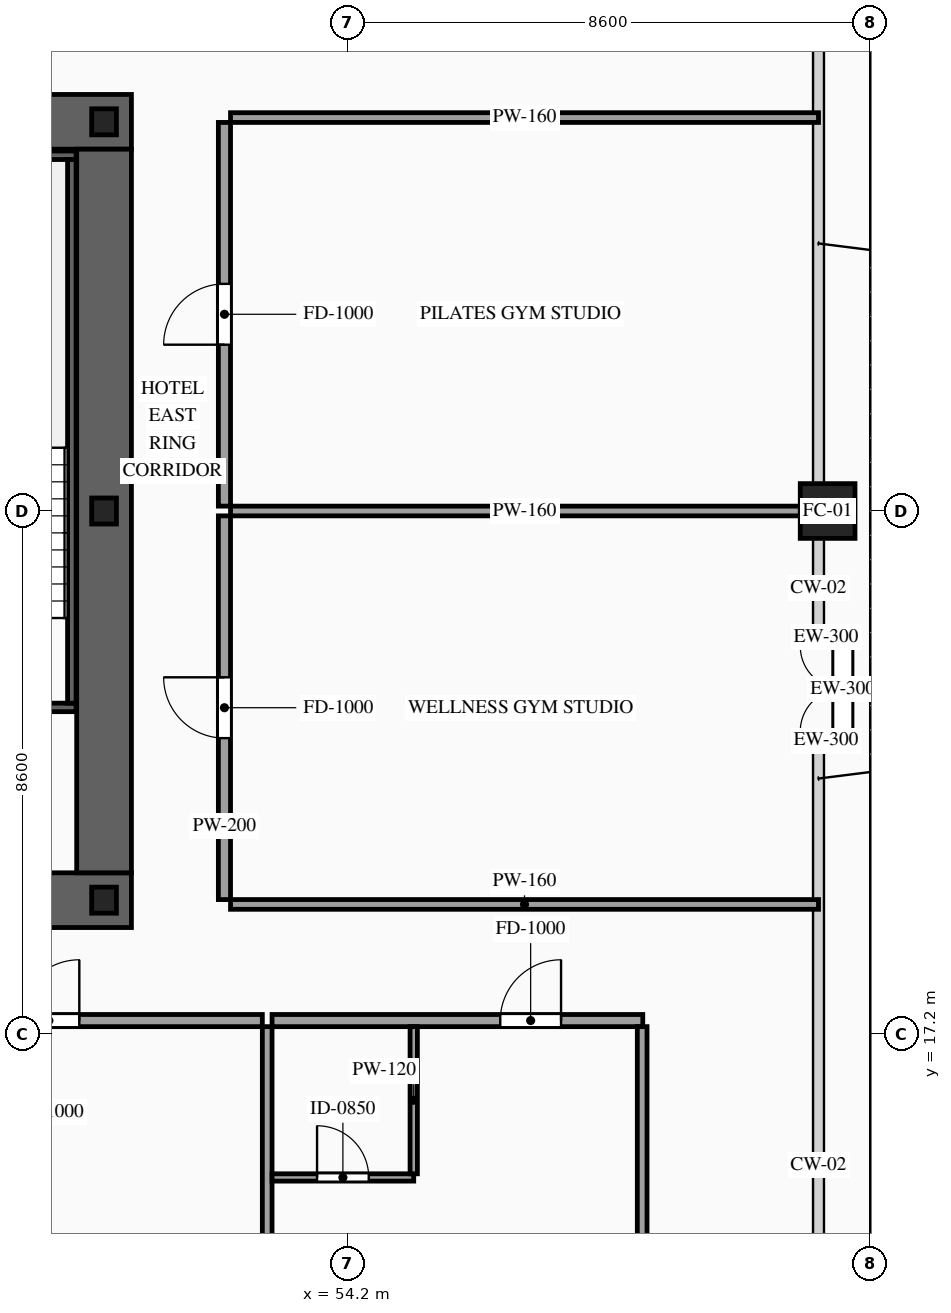
"""IFC4 building model, lengths in metres.
Left out: names, types, materials, properties, quantities, classifications, styles, units other than length and angle.
Written with IfcOpenShell. Run it as: python <this file> out.ifc"""

import sys

from ifc_helpers import new_model, si_unit, direction, frame, frame_2d, origin, origin_2d, place, context, subcontext, project, spatial, rectangle, hollow_rectangle, i_section, extrude, source, transform, mapped, element, fill, save


model = new_model("IFC4")
c1 = context("Model", 3, precision=1e-05, world=origin(), true_north=direction((0.0, 1.0)))
c2 = subcontext(c1, "Body", "Model", "MODEL_VIEW")
j1 = project(units=[si_unit("LENGTHUNIT", "METRE"), si_unit("PLANEANGLEUNIT", "RADIAN")], contexts=[c1])
p1 = place(None, origin())
s1 = spatial("IfcSite", under=j1, at=p1, CompositionType="ELEMENT")
p2 = place(p1, origin())
s2 = spatial("IfcBuilding", under=s1, at=p2, CompositionType="ELEMENT")
p3 = place(p2, frame((0.0, 0.0, 71.2)))
s3 = spatial("IfcBuildingStorey", under=s2, at=p3, CompositionType="ELEMENT", Elevation=71.2)
p4 = place(p3, frame((23.35, 19.4, 0.0), z_axis=(0.0, 0.0, 1.0), x_axis=(1.0, 0.0, 0.0)))
e1 = element("IfcWall", 1, at=p4, inside=s3, PredefinedType="SHEAR", context=c2, shape_type="SweptSolid", body=[
    extrude(rectangle(XDim=27.3, YDim=0.9, at=frame_2d((13.65, 0.0))), origin(), (0.0, 0.0, 1.0), 3.6),
])
p5 = place(p4, frame((2.1, 0.0, 0.0)))
e2 = element("IfcOpeningElement", 2, at=p5, cuts=e1, PredefinedType="OPENING", context=c2, shape_type="SweptSolid", body=[
    extrude(rectangle(XDim=1.1, YDim=2.2, at=frame_2d((0.55, 1.1))), frame((0.0, 0.465, 0.0), z_axis=(0.0, -1.0, 0.0), x_axis=(1.0, 0.0, 0.0)), (0.0, 0.0, 1.0), 0.93),
])
p6 = place(p4, frame((10.0, 0.0, 0.0)))
e3 = element("IfcOpeningElement", 3, at=p6, cuts=e1, PredefinedType="OPENING", context=c2, shape_type="SweptSolid", body=[
    extrude(rectangle(XDim=1.1, YDim=2.2, at=frame_2d((0.55, 1.1))), frame((0.0, 0.465, 0.0), z_axis=(0.0, -1.0, 0.0), x_axis=(1.0, 0.0, 0.0)), (0.0, 0.0, 1.0), 0.93),
])
p7 = place(p4, frame((23.2, 0.0, 0.0)))
e4 = element("IfcOpeningElement", 4, at=p7, cuts=e1, PredefinedType="OPENING", context=c2, shape_type="SweptSolid", body=[
    extrude(rectangle(XDim=1.1, YDim=2.2, at=frame_2d((0.55, 1.1))), frame((0.0, 0.465, 0.0), z_axis=(0.0, -1.0, 0.0), x_axis=(1.0, 0.0, 0.0)), (0.0, 0.0, 1.0), 0.93),
])
p8 = place(p4, frame((19.82, 0.0, 0.0)))
e5 = element("IfcOpeningElement", 5, at=p8, cuts=e1, PredefinedType="OPENING", context=c2, shape_type="SweptSolid", body=[
    extrude(rectangle(XDim=0.9, YDim=2.15, at=frame_2d((0.45, 1.075))), frame((0.0, 0.465, 0.0), z_axis=(0.0, -1.0, 0.0), x_axis=(1.0, 0.0, 0.0)), (0.0, 0.0, 1.0), 0.93),
])
p9 = place(p4, frame((18.38, 0.0, 0.0)))
e6 = element("IfcOpeningElement", 6, at=p9, cuts=e1, PredefinedType="OPENING", context=c2, shape_type="SweptSolid", body=[
    extrude(rectangle(XDim=0.9, YDim=2.15, at=frame_2d((0.45, 1.075))), frame((0.0, 0.465, 0.0), z_axis=(0.0, -1.0, 0.0), x_axis=(1.0, 0.0, 0.0)), (0.0, 0.0, 1.0), 0.93),
])
p10 = place(p3, frame((23.35, 32.2, 0.0), z_axis=(0.0, 0.0, 1.0), x_axis=(1.0, 0.0, 0.0)))
e7 = element("IfcWall", 7, at=p10, inside=s3, PredefinedType="SHEAR", context=c2, shape_type="SweptSolid", body=[
    extrude(rectangle(XDim=27.3, YDim=0.9, at=frame_2d((13.65, 0.0))), origin(), (0.0, 0.0, 1.0), 3.6),
])
p11 = place(p10, frame((4.72, 0.0, 0.0)))
e8 = element("IfcOpeningElement", 8, at=p11, cuts=e7, PredefinedType="OPENING", context=c2, shape_type="SweptSolid", body=[
    extrude(rectangle(XDim=0.9, YDim=2.15, at=frame_2d((0.45, 1.075))), frame((0.0, 0.465, 0.0), z_axis=(0.0, -1.0, 0.0), x_axis=(1.0, 0.0, 0.0)), (0.0, 0.0, 1.0), 0.93),
])
p12 = place(p10, frame((10.0, 0.0, 0.0)))
e9 = element("IfcOpeningElement", 9, at=p12, cuts=e7, PredefinedType="OPENING", context=c2, shape_type="SweptSolid", body=[
    extrude(rectangle(XDim=1.1, YDim=2.2, at=frame_2d((0.55, 1.1))), frame((0.0, 0.465, 0.0), z_axis=(0.0, -1.0, 0.0), x_axis=(1.0, 0.0, 0.0)), (0.0, 0.0, 1.0), 0.93),
])
p13 = place(p10, frame((15.85, 0.0, 0.0)))
e10 = element("IfcOpeningElement", 10, at=p13, cuts=e7, PredefinedType="OPENING", context=c2, shape_type="SweptSolid", body=[
    extrude(rectangle(XDim=1.1, YDim=2.2, at=frame_2d((0.55, 1.1))), frame((0.0, 0.465, 0.0), z_axis=(0.0, -1.0, 0.0), x_axis=(1.0, 0.0, 0.0)), (0.0, 0.0, 1.0), 0.93),
])
p14 = place(p10, frame((18.38, 0.0, 0.0)))
e11 = element("IfcOpeningElement", 11, at=p14, cuts=e7, PredefinedType="OPENING", context=c2, shape_type="SweptSolid", body=[
    extrude(rectangle(XDim=0.9, YDim=2.15, at=frame_2d((0.45, 1.075))), frame((0.0, 0.465, 0.0), z_axis=(0.0, -1.0, 0.0), x_axis=(1.0, 0.0, 0.0)), (0.0, 0.0, 1.0), 0.93),
])
p15 = place(p10, frame((19.82, 0.0, 0.0)))
e12 = element("IfcOpeningElement", 12, at=p15, cuts=e7, PredefinedType="OPENING", context=c2, shape_type="SweptSolid", body=[
    extrude(rectangle(XDim=0.9, YDim=2.15, at=frame_2d((0.45, 1.075))), frame((0.0, 0.465, 0.0), z_axis=(0.0, -1.0, 0.0), x_axis=(1.0, 0.0, 0.0)), (0.0, 0.0, 1.0), 0.93),
])
m1 = source(origin(), c2, "Body", "SweptSolid", [
    extrude(rectangle(XDim=11.9, YDim=0.9, at=frame_2d((5.95, 0.0))), origin(), (0.0, 0.0, 1.0), 3.6),
])
p16 = place(p3, frame((50.2, 19.85, 0.0), z_axis=(0.0, 0.0, 1.0), x_axis=(0.0, 1.0, 0.0)))
e13 = element("IfcWall", 13, at=p16, inside=s3, PredefinedType="SHEAR", context=c2, shape_type="MappedRepresentation", body=[
    mapped(m1, transform((0.0, 0.0, 0.0), scale=1.0)),
])
m2 = source(origin(), c2, "Body", "SweptSolid", [
    extrude(i_section(OverallWidth=0.407, OverallDepth=0.428, WebThickness=0.02, FlangeThickness=0.035, at=origin_2d()), origin(), (0.0, 0.0, 1.0), 3.6),
])
for number, where, z_axis, x_axis in (
    (14, (50.2, 19.4, 0.0), (0.0, 0.0, 1.0), (1.0, 0.0, 0.0)),
    (15, (50.2, 25.8, 0.0), (0.0, 0.0, 1.0), (1.0, 0.0, 0.0)),
    (16, (50.2, 32.2, 0.0), (0.0, 0.0, 1.0), (1.0, 0.0, 0.0)),
):
    element("IfcColumn", number, at=place(p3, frame(where, z_axis=z_axis, x_axis=x_axis)), inside=s3, PredefinedType="COLUMN", context=c2, shape_type="MappedRepresentation", body=[
        mapped(m2, transform((0.0, 0.0, 0.0), scale=1.0)),
    ])
m3 = source(origin(), c2, "Body", "SweptSolid", [
    extrude(hollow_rectangle(XDim=0.9, YDim=0.9, WallThickness=0.042, at=origin_2d()), origin(), (0.0, 0.0, 1.0), 3.6),
])
p17 = place(p3, frame((62.1, 25.8, 0.0), z_axis=(0.0, 0.0, 1.0), x_axis=(1.0, 0.0, 0.0)))
e17 = element("IfcColumn", 17, at=p17, inside=s3, PredefinedType="COLUMN", context=c2, shape_type="MappedRepresentation", body=[
    mapped(m3, transform((0.0, 0.0, 0.0), scale=1.0)),
])
p18 = place(p3, frame((62.35, 21.875, 0.0), z_axis=(0.0, 0.0, 1.0), x_axis=(0.0, 1.0, 0.0)))
e18 = element("IfcWall", 18, at=p18, inside=s3, PredefinedType="SOLIDWALL", context=c2, shape_type="SweptSolid", body=[
    extrude(rectangle(XDim=2.0, YDim=0.3, at=frame_2d((1.0, 0.0))), origin(), (0.0, 0.0, 1.0), 3.38),
])
p19 = place(p18, frame((0.3, 0.0, 0.0)))
e19 = element("IfcOpeningElement", 19, at=p19, cuts=e18, PredefinedType="OPENING", context=c2, shape_type="SweptSolid", body=[
    extrude(rectangle(XDim=1.4, YDim=2.3, at=frame_2d((0.7, 1.15))), frame((0.0, 0.165, 0.0), z_axis=(0.0, -1.0, 0.0), x_axis=(1.0, 0.0, 0.0)), (0.0, 0.0, 1.0), 0.33),
])
m4 = source(origin(), c2, "Body", "SweptSolid", [
    extrude(rectangle(XDim=0.25, YDim=0.3, at=frame_2d((0.125, 0.0))), origin(), (0.0, 0.0, 1.0), 3.38),
])
for number, where, z_axis, x_axis in (
    (20, (61.95, 22.025, 0.0), (0.0, 0.0, 1.0), (1.0, 0.0, 0.0)),
    (21, (62.2, 23.725, 0.0), (0.0, 0.0, 1.0), (-1.0, 0.0, 0.0)),
):
    element("IfcWall", number, at=place(p3, frame(where, z_axis=z_axis, x_axis=x_axis)), inside=s3, PredefinedType="SOLIDWALL", context=c2, shape_type="MappedRepresentation", body=[
        mapped(m4, transform((0.0, 0.0, 0.0), scale=1.0)),
    ])
p20 = place(p3, frame((46.46, 22.57, 0.0), z_axis=(0.0, 0.0, 1.0), x_axis=(1.0, 0.0, 0.0)))
e22 = element("IfcWall", 22, at=p20, inside=s3, PredefinedType="SOLIDWALL", context=c2, shape_type="SweptSolid", body=[
    extrude(rectangle(XDim=3.28, YDim=0.14, at=frame_2d((1.64, 0.0))), origin(), (0.0, 0.0, 1.0), 3.38),
])
p21 = place(p20, frame((1.09, 0.0, 0.0)))
e23 = element("IfcOpeningElement", 23, at=p21, cuts=e22, PredefinedType="OPENING", context=c2, shape_type="SweptSolid", body=[
    extrude(rectangle(XDim=1.1, YDim=2.2, at=frame_2d((0.55, 1.1))), frame((0.0, 0.085, 0.0), z_axis=(0.0, -1.0, 0.0), x_axis=(1.0, 0.0, 0.0)), (0.0, 0.0, 1.0), 0.17),
])
m5 = source(origin(), c2, "Body", "SweptSolid", [
    extrude(rectangle(XDim=3.28, YDim=0.14, at=frame_2d((1.64, 0.0))), origin(), (0.0, 0.0, 1.0), 3.38),
])
p22 = place(p3, frame((46.46, 31.65, 0.0), z_axis=(0.0, 0.0, 1.0), x_axis=(1.0, 0.0, 0.0)))
e24 = element("IfcWall", 24, at=p22, inside=s3, PredefinedType="SOLIDWALL", context=c2, shape_type="MappedRepresentation", body=[
    mapped(m5, transform((0.0, 0.0, 0.0), scale=1.0)),
])
m6 = source(origin(), c2, "Body", "SweptSolid", [
    extrude(rectangle(XDim=8.94, YDim=0.14, at=frame_2d((4.47, 0.0))), origin(), (0.0, 0.0, 1.0), 3.38),
])
p23 = place(p3, frame((49.67, 22.64, 0.0), z_axis=(0.0, 0.0, 1.0), x_axis=(0.0, 1.0, 0.0)))
e25 = element("IfcWall", 25, at=p23, inside=s3, PredefinedType="SOLIDWALL", context=c2, shape_type="MappedRepresentation", body=[
    mapped(m6, transform((0.0, 0.0, 0.0), scale=1.0)),
])
p24 = place(p3, frame((43.374, 17.42, 0.0), z_axis=(0.0, 0.0, 1.0), x_axis=(1.0, 0.0, 0.0)))
e26 = element("IfcWall", 26, at=p24, inside=s3, PredefinedType="PARTITIONING", context=c2, shape_type="SweptSolid", body=[
    extrude(rectangle(XDim=9.429, YDim=0.2, at=frame_2d((4.714, 0.0))), origin(), (0.0, 0.0, 1.0), 3.38),
])
p25 = place(p24, frame((5.419, 0.0, 0.0)))
e27 = element("IfcOpeningElement", 27, at=p25, cuts=e26, PredefinedType="OPENING", context=c2, shape_type="SweptSolid", body=[
    extrude(rectangle(XDim=1.0, YDim=2.2, at=frame_2d((0.5, 1.1))), frame((0.0, 0.115, 0.0), z_axis=(0.0, -1.0, 0.0), x_axis=(1.0, 0.0, 0.0)), (0.0, 0.0, 1.0), 0.23),
])
m7 = source(origin(), c2, "Body", "SweptSolid", [
    extrude(rectangle(XDim=16.47, YDim=0.16, at=frame_2d((8.235, 0.0))), origin(), (0.0, 0.0, 1.0), 3.38),
])
p26 = place(p3, frame((52.883, 0.85, 0.0), z_axis=(0.0, 0.0, 1.0), x_axis=(0.0, 1.0, 0.0)))
e28 = element("IfcWall", 28, at=p26, inside=s3, PredefinedType="PARTITIONING", context=c2, shape_type="MappedRepresentation", body=[
    mapped(m7, transform((0.0, 0.0, 0.0), scale=1.0)),
])
p27 = place(p3, frame((52.963, 17.42, 0.0), z_axis=(0.0, 0.0, 1.0), x_axis=(1.0, 0.0, 0.0)))
e29 = element("IfcWall", 29, at=p27, inside=s3, PredefinedType="PARTITIONING", context=c2, shape_type="SweptSolid", body=[
    extrude(rectangle(XDim=6.097, YDim=0.2, at=frame_2d((3.049, 0.0))), origin(), (0.0, 0.0, 1.0), 3.38),
])
p28 = place(p27, frame((3.753, 0.0, 0.0)))
e30 = element("IfcOpeningElement", 30, at=p28, cuts=e29, PredefinedType="OPENING", context=c2, shape_type="SweptSolid", body=[
    extrude(rectangle(XDim=1.0, YDim=2.2, at=frame_2d((0.5, 1.1))), frame((0.0, 0.115, 0.0), z_axis=(0.0, -1.0, 0.0), x_axis=(1.0, 0.0, 0.0)), (0.0, 0.0, 1.0), 0.23),
])
m8 = source(origin(), c2, "Body", "SweptSolid", [
    extrude(rectangle(XDim=16.32, YDim=0.16, at=frame_2d((8.16, 0.0))), origin(), (0.0, 0.0, 1.0), 3.38),
])
p29 = place(p3, frame((59.05, 1.0, 0.0), z_axis=(0.0, 0.0, 1.0), x_axis=(0.0, 1.0, 0.0)))
e31 = element("IfcWall", 31, at=p29, inside=s3, PredefinedType="PARTITIONING", context=c2, shape_type="MappedRepresentation", body=[
    mapped(m8, transform((0.0, 0.0, 0.0), scale=1.0)),
])
p30 = place(p3, frame((52.963, 14.84, 0.0), z_axis=(0.0, 0.0, 1.0), x_axis=(1.0, 0.0, 0.0)))
e32 = element("IfcWall", 32, at=p30, inside=s3, PredefinedType="PARTITIONING", context=c2, shape_type="SweptSolid", body=[
    extrude(rectangle(XDim=2.33, YDim=0.12, at=frame_2d((1.165, 0.0))), origin(), (0.0, 0.0, 1.0), 3.38),
])
p31 = place(p30, frame((0.74, 0.0, 0.0)))
e33 = element("IfcOpeningElement", 33, at=p31, cuts=e32, PredefinedType="OPENING", context=c2, shape_type="SweptSolid", body=[
    extrude(rectangle(XDim=0.85, YDim=2.1, at=frame_2d((0.425, 1.05))), frame((0.0, 0.075, 0.0), z_axis=(0.0, -1.0, 0.0), x_axis=(1.0, 0.0, 0.0)), (0.0, 0.0, 1.0), 0.15),
])
m9 = source(origin(), c2, "Body", "SweptSolid", [
    extrude(rectangle(XDim=2.42, YDim=0.12, at=frame_2d((1.21, 0.0))), origin(), (0.0, 0.0, 1.0), 3.38),
])
p32 = place(p3, frame((55.293, 14.9, 0.0), z_axis=(0.0, 0.0, 1.0), x_axis=(0.0, 1.0, 0.0)))
e34 = element("IfcWall", 34, at=p32, inside=s3, PredefinedType="PARTITIONING", context=c2, shape_type="MappedRepresentation", body=[
    mapped(m9, transform((0.0, 0.0, 0.0), scale=1.0)),
])
p33 = place(p3, frame((52.18, 19.41, 0.0), z_axis=(0.0, 0.0, 1.0), x_axis=(0.0, 1.0, 0.0)))
e35 = element("IfcWall", 35, at=p33, inside=s3, PredefinedType="PARTITIONING", context=c2, shape_type="SweptSolid", body=[
    extrude(rectangle(XDim=6.31, YDim=0.2, at=frame_2d((3.155, 0.0))), origin(), (0.0, 0.0, 1.0), 3.38),
])
p34 = place(p33, frame((2.655, 0.0, 0.0)))
e36 = element("IfcOpeningElement", 36, at=p34, cuts=e35, PredefinedType="OPENING", context=c2, shape_type="SweptSolid", body=[
    extrude(rectangle(XDim=1.0, YDim=2.2, at=frame_2d((0.5, 1.1))), frame((0.0, 0.115, 0.0), z_axis=(0.0, -1.0, 0.0), x_axis=(1.0, 0.0, 0.0)), (0.0, 0.0, 1.0), 0.23),
])
m10 = source(origin(), c2, "Body", "SweptSolid", [
    extrude(rectangle(XDim=9.67, YDim=0.16, at=frame_2d((4.835, 0.0))), origin(), (0.0, 0.0, 1.0), 2.575),
])
p35 = place(p3, frame((52.28, 25.8, 0.0), z_axis=(0.0, 0.0, 1.0), x_axis=(1.0, 0.0, 0.0)))
e37 = element("IfcWall", 37, at=p35, inside=s3, PredefinedType="PARTITIONING", context=c2, shape_type="MappedRepresentation", body=[
    mapped(m10, transform((0.0, 0.0, 0.0), scale=1.0)),
])
m11 = source(origin(), c2, "Body", "SweptSolid", [
    extrude(rectangle(XDim=9.67, YDim=0.16, at=frame_2d((4.835, 0.0))), origin(), (0.0, 0.0, 1.0), 2.875),
])
p36 = place(p3, frame((52.28, 19.33, 0.0), z_axis=(0.0, 0.0, 1.0), x_axis=(1.0, 0.0, 0.0)))
e38 = element("IfcWall", 38, at=p36, inside=s3, PredefinedType="PARTITIONING", context=c2, shape_type="MappedRepresentation", body=[
    mapped(m11, transform((0.0, 0.0, 0.0), scale=1.0)),
])
p37 = place(p3, frame((52.18, 25.88, 0.0), z_axis=(0.0, 0.0, 1.0), x_axis=(0.0, 1.0, 0.0)))
e39 = element("IfcWall", 39, at=p37, inside=s3, PredefinedType="PARTITIONING", context=c2, shape_type="SweptSolid", body=[
    extrude(rectangle(XDim=6.31, YDim=0.2, at=frame_2d((3.155, 0.0))), origin(), (0.0, 0.0, 1.0), 3.38),
])
p38 = place(p37, frame((2.655, 0.0, 0.0)))
e40 = element("IfcOpeningElement", 40, at=p38, cuts=e39, PredefinedType="OPENING", context=c2, shape_type="SweptSolid", body=[
    extrude(rectangle(XDim=1.0, YDim=2.2, at=frame_2d((0.5, 1.1))), frame((0.0, 0.115, 0.0), z_axis=(0.0, -1.0, 0.0), x_axis=(1.0, 0.0, 0.0)), (0.0, 0.0, 1.0), 0.23),
])
p39 = place(p3, frame((52.28, 32.27, 0.0), z_axis=(0.0, 0.0, 1.0), x_axis=(1.0, 0.0, 0.0)))
e41 = element("IfcWall", 41, at=p39, inside=s3, PredefinedType="PARTITIONING", context=c2, shape_type="MappedRepresentation", body=[
    mapped(m11, transform((0.0, 0.0, 0.0), scale=1.0)),
])
m12 = source(origin(), c2, "Body", "SweptSolid", [
    extrude(rectangle(XDim=1.4, YDim=2.3, at=frame_2d((0.7, 1.15))), frame((0.0, 0.025, 0.0), z_axis=(0.0, -1.0, 0.0), x_axis=(1.0, 0.0, 0.0)), (0.0, 0.0, 1.0), 0.05),
])
p40 = place(p19, origin())
e42 = element("IfcDoor", 42, at=p40, inside=s3, OperationType="DOUBLE_DOOR_SINGLE_SWING", PredefinedType="DOOR", context=c2, shape_type="MappedRepresentation", body=[
    mapped(m12, transform((0.0, 0.0, 0.0), scale=1.0)),
])
fill(e19, e42)
m13 = source(origin(), c2, "Body", "SweptSolid", [
    extrude(rectangle(XDim=1.0, YDim=2.2, at=frame_2d((0.5, 1.1))), frame((0.0, 0.025, 0.0), z_axis=(0.0, -1.0, 0.0), x_axis=(1.0, 0.0, 0.0)), (0.0, 0.0, 1.0), 0.05),
])
p41 = place(p25, origin())
e43 = element("IfcDoor", 43, at=p41, inside=s3, OperationType="SINGLE_SWING_RIGHT", PredefinedType="DOOR", context=c2, shape_type="MappedRepresentation", body=[
    mapped(m13, transform((0.0, 0.0, 0.0), scale=1.0)),
])
fill(e27, e43)
p42 = place(p28, origin())
e44 = element("IfcDoor", 44, at=p42, inside=s3, OperationType="SINGLE_SWING_RIGHT", PredefinedType="DOOR", context=c2, shape_type="MappedRepresentation", body=[
    mapped(m13, transform((0.0, 0.0, 0.0), scale=1.0)),
])
fill(e30, e44)
m14 = source(origin(), c2, "Body", "SweptSolid", [
    extrude(rectangle(XDim=0.85, YDim=2.1, at=frame_2d((0.425, 1.05))), frame((0.0, 0.025, 0.0), z_axis=(0.0, -1.0, 0.0), x_axis=(1.0, 0.0, 0.0)), (0.0, 0.0, 1.0), 0.05),
])
p43 = place(p31, origin())
e45 = element("IfcDoor", 45, at=p43, inside=s3, OperationType="SINGLE_SWING_LEFT", PredefinedType="DOOR", context=c2, shape_type="MappedRepresentation", body=[
    mapped(m14, transform((0.0, 0.0, 0.0), scale=1.0)),
])
fill(e33, e45)
p44 = place(p34, origin())
e46 = element("IfcDoor", 46, at=p44, inside=s3, OperationType="SINGLE_SWING_RIGHT", PredefinedType="DOOR", context=c2, shape_type="MappedRepresentation", body=[
    mapped(m13, transform((0.0, 0.0, 0.0), scale=1.0)),
])
fill(e36, e46)
p45 = place(p38, origin())
e47 = element("IfcDoor", 47, at=p45, inside=s3, OperationType="SINGLE_SWING_LEFT", PredefinedType="DOOR", context=c2, shape_type="MappedRepresentation", body=[
    mapped(m13, transform((0.0, 0.0, 0.0), scale=1.0)),
])
fill(e40, e47)
save(model, sys.argv[1])
